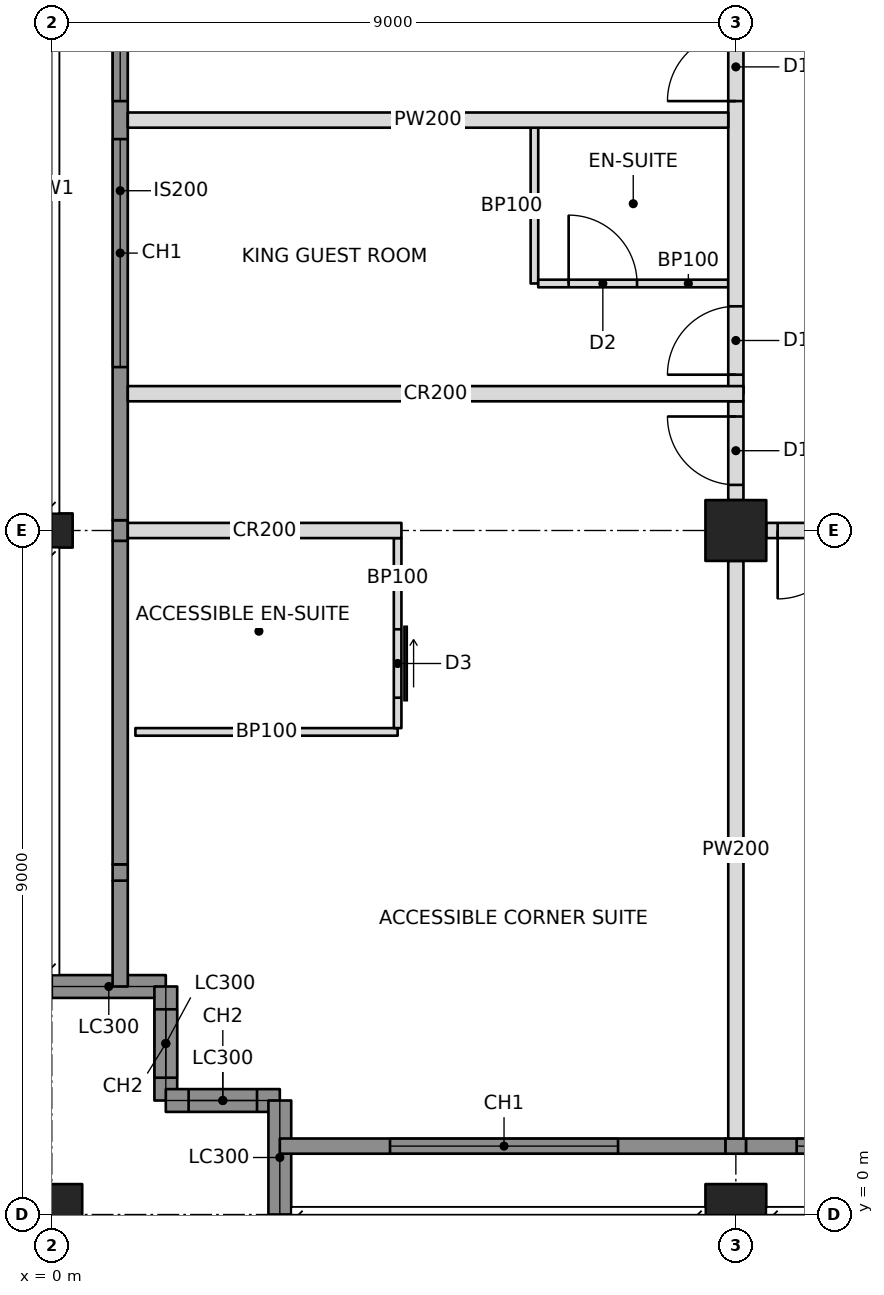
"""IFC4 building model, lengths in metres.
Left out: names, types, materials, properties, quantities, classifications, styles, units other than length and angle.
Written with IfcOpenShell. Run it as: python <this file> out.ifc"""

import sys

from ifc_helpers import new_model, si_unit, direction, frame, frame_2d, origin, origin_with_axes, origin_2d, place, context, subcontext, project, spatial, rectangle, hollow_rectangle, i_section, extrude, element, fill, save


model = new_model("IFC4")
c1 = context("Model", 3, precision=1e-05, world=origin(), true_north=direction((0.0, 1.0)))
c2 = subcontext(c1, "Body", "Model", "MODEL_VIEW")
j1 = project(units=[si_unit("LENGTHUNIT", "METRE"), si_unit("PLANEANGLEUNIT", "RADIAN")], contexts=[c1])
p1 = place(None, origin())
s1 = spatial("IfcSite", under=j1, at=p1, CompositionType="ELEMENT")
p2 = place(p1, origin())
s2 = spatial("IfcBuilding", under=s1, at=p2, CompositionType="ELEMENT")
p3 = place(p2, frame((0.0, 0.0, 174.0)))
s3 = spatial("IfcBuildingStorey", under=s2, at=p3, CompositionType="ELEMENT", Elevation=174.0)
p4 = place(p3, origin_with_axes())
e1 = element("IfcColumn", 1, at=p4, inside=s3, PredefinedType="COLUMN", context=c2, shape_type="SweptSolid", body=[
    extrude(hollow_rectangle(XDim=0.8, YDim=0.8, WallThickness=0.07, at=origin_2d()), origin(), (0.0, 0.0, 1.0), 3.4),
])
p5 = place(p3, frame((0.0, 9.0, 0.0), z_axis=(0.0, 0.0, 1.0), x_axis=(0.0, 1.0, 0.0)))
e2 = element("IfcColumn", 2, at=p5, inside=s3, PredefinedType="COLUMN", context=c2, shape_type="SweptSolid", body=[
    extrude(i_section(OverallWidth=0.449, OverallDepth=0.549, WebThickness=0.072, FlangeThickness=0.115, at=origin_2d()), origin(), (0.0, 0.0, 1.0), 3.4),
])
p6 = place(p3, frame((9.0, 0.0, 0.0), z_axis=(0.0, 0.0, 1.0), x_axis=(1.0, 0.0, 0.0)))
e3 = element("IfcColumn", 3, at=p6, inside=s3, PredefinedType="COLUMN", context=c2, shape_type="SweptSolid", body=[
    extrude(hollow_rectangle(XDim=0.8, YDim=0.8, WallThickness=0.07, at=origin_2d()), origin(), (0.0, 0.0, 1.0), 3.4),
])
p7 = place(p3, frame((9.0, 9.0, 0.0), z_axis=(0.0, 0.0, 1.0), x_axis=(1.0, 0.0, 0.0)))
e4 = element("IfcColumn", 4, at=p7, inside=s3, PredefinedType="COLUMN", context=c2, shape_type="SweptSolid", body=[
    extrude(hollow_rectangle(XDim=0.8, YDim=0.8, WallThickness=0.06, at=origin_2d()), origin(), (0.0, 0.0, 1.0), 3.4),
])
p8 = place(p3, frame((0.0, 3.0, 0.0), z_axis=(0.0, 0.0, 1.0), x_axis=(1.0, 0.0, 0.0)))
e5 = element("IfcWall", 5, at=p8, inside=s3, PredefinedType="SOLIDWALL", context=c2, shape_type="SweptSolid", body=[
    extrude(rectangle(XDim=1.5, YDim=0.3, at=frame_2d((0.75, 0.0))), origin(), (0.0, 0.0, 1.0), 2.42),
])
p9 = place(p3, frame((1.5, 3.0, 0.0), z_axis=(0.0, 0.0, 1.0), x_axis=(0.0, -1.0, 0.0)))
e6 = element("IfcWall", 6, at=p9, inside=s3, PredefinedType="SOLIDWALL", context=c2, shape_type="SweptSolid", body=[
    extrude(rectangle(XDim=1.5, YDim=0.3, at=frame_2d((0.75, 0.0))), origin(), (0.0, 0.0, 1.0), 3.2),
])
p10 = place(p9, frame((0.3, 0.0, 0.6)))
e7 = element("IfcOpeningElement", 7, at=p10, cuts=e6, PredefinedType="OPENING", context=c2, shape_type="SweptSolid", body=[
    extrude(rectangle(XDim=0.9, YDim=2.2, at=frame_2d((0.45, 1.1))), frame((0.0, 0.16, 0.0), z_axis=(0.0, -1.0, 0.0), x_axis=(1.0, 0.0, 0.0)), (0.0, 0.0, 1.0), 0.32),
])
p11 = place(p3, frame((1.5, 1.5, 0.0), z_axis=(0.0, 0.0, 1.0), x_axis=(1.0, 0.0, 0.0)))
e8 = element("IfcWall", 8, at=p11, inside=s3, PredefinedType="SOLIDWALL", context=c2, shape_type="SweptSolid", body=[
    extrude(rectangle(XDim=1.5, YDim=0.3, at=frame_2d((0.75, 0.0))), origin(), (0.0, 0.0, 1.0), 3.2),
])
p12 = place(p11, frame((0.3, 0.0, 0.6)))
e9 = element("IfcOpeningElement", 9, at=p12, cuts=e8, PredefinedType="OPENING", context=c2, shape_type="SweptSolid", body=[
    extrude(rectangle(XDim=0.9, YDim=2.2, at=frame_2d((0.45, 1.1))), frame((0.0, 0.16, 0.0), z_axis=(0.0, -1.0, 0.0), x_axis=(1.0, 0.0, 0.0)), (0.0, 0.0, 1.0), 0.32),
])
p13 = place(p3, frame((3.0, 1.5, 0.0), z_axis=(0.0, 0.0, 1.0), x_axis=(0.0, -1.0, 0.0)))
e10 = element("IfcWall", 10, at=p13, inside=s3, PredefinedType="SOLIDWALL", context=c2, shape_type="SweptSolid", body=[
    extrude(rectangle(XDim=1.5, YDim=0.3, at=frame_2d((0.75, 0.0))), origin(), (0.0, 0.0, 1.0), 2.42),
])
p14 = place(p3, frame((3.0, 0.9, 0.0), z_axis=(0.0, 0.0, 1.0), x_axis=(1.0, 0.0, 0.0)))
e11 = element("IfcWall", 11, at=p14, inside=s3, PredefinedType="SOLIDWALL", context=c2, shape_type="SweptSolid", body=[
    extrude(rectangle(XDim=5.865, YDim=0.2, at=frame_2d((2.932, 0.0))), origin(), (0.0, 0.0, 1.0), 3.2),
])
p15 = place(p14, frame((1.45, 0.0, 0.6)))
e12 = element("IfcOpeningElement", 12, at=p15, cuts=e11, PredefinedType="OPENING", context=c2, shape_type="SweptSolid", body=[
    extrude(rectangle(XDim=3.0, YDim=2.2, at=frame_2d((1.5, 1.1))), frame((0.0, 0.11, 0.0), z_axis=(0.0, -1.0, 0.0), x_axis=(1.0, 0.0, 0.0)), (0.0, 0.0, 1.0), 0.22),
])
p16 = place(p3, frame((0.9, 3.0, 0.0), z_axis=(0.0, 0.0, 1.0), x_axis=(0.0, 1.0, 0.0)))
e13 = element("IfcWall", 13, at=p16, inside=s3, PredefinedType="SOLIDWALL", context=c2, shape_type="SweptSolid", body=[
    extrude(rectangle(XDim=1.393, YDim=0.2, at=frame_2d((0.696, 0.0))), origin(), (0.0, 0.0, 1.0), 3.2),
])
p17 = place(p3, frame((1.0, 9.0, 0.0), z_axis=(0.0, 0.0, 1.0), x_axis=(1.0, 0.0, 0.0)))
e14 = element("IfcWall", 14, at=p17, inside=s3, PredefinedType="PARTITIONING", context=c2, shape_type="SweptSolid", body=[
    extrude(rectangle(XDim=3.6, YDim=0.2, at=frame_2d((1.8, 0.0))), origin(), (0.0, 0.0, 1.0), 2.438),
])
p18 = place(p3, frame((9.4, 9.0, 0.0), z_axis=(0.0, 0.0, 1.0), x_axis=(1.0, 0.0, 0.0)))
e15 = element("IfcWall", 15, at=p18, inside=s3, PredefinedType="PARTITIONING", context=c2, shape_type="SweptSolid", body=[
    extrude(rectangle(XDim=8.2, YDim=0.2, at=frame_2d((4.1, 0.0))), origin(), (0.0, 0.0, 1.0), 2.405),
])
p19 = place(p18, frame((0.15, 0.0, 0.0)))
e16 = element("IfcOpeningElement", 16, at=p19, cuts=e15, PredefinedType="OPENING", context=c2, shape_type="SweptSolid", body=[
    extrude(rectangle(XDim=0.9, YDim=2.1, at=frame_2d((0.45, 1.05))), frame((0.0, 0.11, 0.0), z_axis=(0.0, -1.0, 0.0), x_axis=(1.0, 0.0, 0.0)), (0.0, 0.0, 1.0), 0.22),
])
p20 = place(p3, frame((9.0, 10.8, 0.0), z_axis=(0.0, 0.0, 1.0), x_axis=(0.0, 1.0, 0.0)))
e17 = element("IfcWall", 17, at=p20, inside=s3, PredefinedType="PARTITIONING", context=c2, shape_type="SweptSolid", body=[
    extrude(rectangle(XDim=6.8, YDim=0.2, at=frame_2d((3.4, 0.0))), origin(), (0.0, 0.0, 1.0), 2.405),
])
p21 = place(p20, frame((0.25, 0.0, 0.0)))
e18 = element("IfcOpeningElement", 18, at=p21, cuts=e17, PredefinedType="OPENING", context=c2, shape_type="SweptSolid", body=[
    extrude(rectangle(XDim=0.9, YDim=2.1, at=frame_2d((0.45, 1.05))), frame((0.0, 0.11, 0.0), z_axis=(0.0, -1.0, 0.0), x_axis=(1.0, 0.0, 0.0)), (0.0, 0.0, 1.0), 0.22),
])
p22 = place(p20, frame((3.85, 0.0, 0.0)))
e19 = element("IfcOpeningElement", 19, at=p22, cuts=e17, PredefinedType="OPENING", context=c2, shape_type="SweptSolid", body=[
    extrude(rectangle(XDim=0.9, YDim=2.1, at=frame_2d((0.45, 1.05))), frame((0.0, 0.11, 0.0), z_axis=(0.0, -1.0, 0.0), x_axis=(1.0, 0.0, 0.0)), (0.0, 0.0, 1.0), 0.22),
])
p23 = place(p3, frame((1.0, 10.8, 0.0), z_axis=(0.0, 0.0, 1.0), x_axis=(1.0, 0.0, 0.0)))
e20 = element("IfcWall", 20, at=p23, inside=s3, PredefinedType="PARTITIONING", context=c2, shape_type="SweptSolid", body=[
    extrude(rectangle(XDim=8.1, YDim=0.2, at=frame_2d((4.05, 0.0))), origin(), (0.0, 0.0, 1.0), 2.404),
])
p24 = place(p3, frame((9.0, 8.6, 0.0), z_axis=(0.0, 0.0, 1.0), x_axis=(0.0, -1.0, 0.0)))
e21 = element("IfcWall", 21, at=p24, inside=s3, PredefinedType="PARTITIONING", context=c2, shape_type="SweptSolid", body=[
    extrude(rectangle(XDim=7.6, YDim=0.2, at=frame_2d((3.8, 0.0))), origin(), (0.0, 0.0, 1.0), 2.438),
])
p25 = place(p3, frame((1.1, 6.35, 0.0), z_axis=(0.0, 0.0, 1.0), x_axis=(1.0, 0.0, 0.0)))
e22 = element("IfcWall", 22, at=p25, inside=s3, PredefinedType="PARTITIONING", context=c2, shape_type="SweptSolid", body=[
    extrude(rectangle(XDim=3.45, YDim=0.1, at=frame_2d((1.725, 0.0))), origin(), (0.0, 0.0, 1.0), 3.2),
])
p26 = place(p3, frame((4.55, 8.9, 0.0), z_axis=(0.0, 0.0, 1.0), x_axis=(0.0, -1.0, 0.0)))
e23 = element("IfcWall", 23, at=p26, inside=s3, PredefinedType="PARTITIONING", context=c2, shape_type="SweptSolid", body=[
    extrude(rectangle(XDim=2.5, YDim=0.1, at=frame_2d((1.25, 0.0))), origin(), (0.0, 0.0, 1.0), 2.438),
])
p27 = place(p26, frame((1.2, 0.0, 0.0)))
e24 = element("IfcOpeningElement", 24, at=p27, cuts=e23, PredefinedType="OPENING", context=c2, shape_type="SweptSolid", body=[
    extrude(rectangle(XDim=0.9, YDim=2.1, at=frame_2d((0.45, 1.05))), frame((0.0, 0.06, 0.0), z_axis=(0.0, -1.0, 0.0), x_axis=(1.0, 0.0, 0.0)), (0.0, 0.0, 1.0), 0.12),
])
p28 = place(p3, frame((8.9, 14.4, 0.0), z_axis=(0.0, 0.0, 1.0), x_axis=(-1.0, 0.0, 0.0)))
e25 = element("IfcWall", 25, at=p28, inside=s3, PredefinedType="PARTITIONING", context=c2, shape_type="SweptSolid", body=[
    extrude(rectangle(XDim=7.9, YDim=0.2, at=frame_2d((3.95, 0.0))), origin(), (0.0, 0.0, 1.0), 2.404),
])
p29 = place(p3, frame((6.35, 12.25, 0.0), z_axis=(0.0, 0.0, 1.0), x_axis=(0.0, 1.0, 0.0)))
e26 = element("IfcWall", 26, at=p29, inside=s3, PredefinedType="PARTITIONING", context=c2, shape_type="SweptSolid", body=[
    extrude(rectangle(XDim=2.05, YDim=0.1, at=frame_2d((1.025, 0.0))), origin(), (0.0, 0.0, 1.0), 3.2),
])
p30 = place(p3, frame((8.9, 12.25, 0.0), z_axis=(0.0, 0.0, 1.0), x_axis=(-1.0, 0.0, 0.0)))
e27 = element("IfcWall", 27, at=p30, inside=s3, PredefinedType="PARTITIONING", context=c2, shape_type="SweptSolid", body=[
    extrude(rectangle(XDim=2.5, YDim=0.1, at=frame_2d((1.25, 0.0))), origin(), (0.0, 0.0, 1.0), 2.404),
])
p31 = place(p30, frame((1.2, 0.0, 0.0)))
e28 = element("IfcOpeningElement", 28, at=p31, cuts=e27, PredefinedType="OPENING", context=c2, shape_type="SweptSolid", body=[
    extrude(rectangle(XDim=0.9, YDim=2.1, at=frame_2d((0.45, 1.05))), frame((0.0, 0.06, 0.0), z_axis=(0.0, -1.0, 0.0), x_axis=(1.0, 0.0, 0.0)), (0.0, 0.0, 1.0), 0.12),
])
p32 = place(p3, frame((9.0, 9.4, 0.0), z_axis=(0.0, 0.0, 1.0), x_axis=(0.0, 1.0, 0.0)))
e29 = element("IfcWall", 29, at=p32, inside=s3, PredefinedType="PARTITIONING", context=c2, shape_type="SweptSolid", body=[
    extrude(rectangle(XDim=1.3, YDim=0.2, at=frame_2d((0.65, 0.0))), origin(), (0.0, 0.0, 1.0), 2.405),
])
p33 = place(p32, frame((0.2, 0.0, 0.0)))
e30 = element("IfcOpeningElement", 30, at=p33, cuts=e29, PredefinedType="OPENING", context=c2, shape_type="SweptSolid", body=[
    extrude(rectangle(XDim=0.9, YDim=2.1, at=frame_2d((0.45, 1.05))), frame((0.0, 0.11, 0.0), z_axis=(0.0, -1.0, 0.0), x_axis=(1.0, 0.0, 0.0)), (0.0, 0.0, 1.0), 0.22),
])
p34 = place(p3, frame((8.865, 0.9, 0.0), z_axis=(0.0, 0.0, 1.0), x_axis=(1.0, 0.0, 0.0)))
e31 = element("IfcWall", 31, at=p34, inside=s3, PredefinedType="SOLIDWALL", context=c2, shape_type="SweptSolid", body=[
    extrude(rectangle(XDim=0.271, YDim=0.2, at=frame_2d((0.135, 0.0))), origin(), (0.0, 0.0, 1.0), 2.438),
])
p35 = place(p3, frame((9.135, 0.9, 0.0), z_axis=(0.0, 0.0, 1.0), x_axis=(1.0, 0.0, 0.0)))
e32 = element("IfcWall", 32, at=p35, inside=s3, PredefinedType="SOLIDWALL", context=c2, shape_type="SweptSolid", body=[
    extrude(rectangle(XDim=8.671, YDim=0.2, at=frame_2d((4.335, 0.0))), origin(), (0.0, 0.0, 1.0), 3.2),
])
p36 = place(p35, frame((0.665, 0.0, 0.6)))
e33 = element("IfcOpeningElement", 33, at=p36, cuts=e32, PredefinedType="OPENING", context=c2, shape_type="SweptSolid", body=[
    extrude(rectangle(XDim=3.0, YDim=2.2, at=frame_2d((1.5, 1.1))), frame((0.0, 0.11, 0.0), z_axis=(0.0, -1.0, 0.0), x_axis=(1.0, 0.0, 0.0)), (0.0, 0.0, 1.0), 0.22),
])
p37 = place(p35, frame((5.065, 0.0, 0.6)))
e34 = element("IfcOpeningElement", 34, at=p37, cuts=e32, PredefinedType="OPENING", context=c2, shape_type="SweptSolid", body=[
    extrude(rectangle(XDim=3.0, YDim=2.2, at=frame_2d((1.5, 1.1))), frame((0.0, 0.11, 0.0), z_axis=(0.0, -1.0, 0.0), x_axis=(1.0, 0.0, 0.0)), (0.0, 0.0, 1.0), 0.22),
])
p38 = place(p3, frame((0.9, 4.393, 0.0), z_axis=(0.0, 0.0, 1.0), x_axis=(0.0, 1.0, 0.0)))
e35 = element("IfcWall", 35, at=p38, inside=s3, PredefinedType="SOLIDWALL", context=c2, shape_type="SweptSolid", body=[
    extrude(rectangle(XDim=0.215, YDim=0.2, at=frame_2d((0.107, 0.0))), origin(), (0.0, 0.0, 1.0), 2.661),
])
p39 = place(p3, frame((0.9, 4.607, 0.0), z_axis=(0.0, 0.0, 1.0), x_axis=(0.0, 1.0, 0.0)))
e36 = element("IfcWall", 36, at=p39, inside=s3, PredefinedType="SOLIDWALL", context=c2, shape_type="SweptSolid", body=[
    extrude(rectangle(XDim=4.257, YDim=0.2, at=frame_2d((2.129, 0.0))), origin(), (0.0, 0.0, 1.0), 3.2),
])
p40 = place(p3, frame((0.9, 8.865, 0.0), z_axis=(0.0, 0.0, 1.0), x_axis=(0.0, 1.0, 0.0)))
e37 = element("IfcWall", 37, at=p40, inside=s3, PredefinedType="SOLIDWALL", context=c2, shape_type="SweptSolid", body=[
    extrude(rectangle(XDim=0.271, YDim=0.2, at=frame_2d((0.135, 0.0))), origin(), (0.0, 0.0, 1.0), 2.438),
])
p41 = place(p3, frame((0.9, 9.135, 0.0), z_axis=(0.0, 0.0, 1.0), x_axis=(0.0, 1.0, 0.0)))
e38 = element("IfcWall", 38, at=p41, inside=s3, PredefinedType="SOLIDWALL", context=c2, shape_type="SweptSolid", body=[
    extrude(rectangle(XDim=8.671, YDim=0.2, at=frame_2d((4.335, 0.0))), origin(), (0.0, 0.0, 1.0), 3.2),
])
p42 = place(p41, frame((2.015, 0.0, 0.6)))
e39 = element("IfcOpeningElement", 39, at=p42, cuts=e38, PredefinedType="OPENING", context=c2, shape_type="SweptSolid", body=[
    extrude(rectangle(XDim=3.0, YDim=2.2, at=frame_2d((1.5, 1.1))), frame((0.0, 0.11, 0.0), z_axis=(0.0, -1.0, 0.0), x_axis=(1.0, 0.0, 0.0)), (0.0, 0.0, 1.0), 0.22),
])
p43 = place(p41, frame((5.515, 0.0, 0.6)))
e40 = element("IfcOpeningElement", 40, at=p43, cuts=e38, PredefinedType="OPENING", context=c2, shape_type="SweptSolid", body=[
    extrude(rectangle(XDim=3.0, YDim=2.2, at=frame_2d((1.5, 1.1))), frame((0.0, 0.11, 0.0), z_axis=(0.0, -1.0, 0.0), x_axis=(1.0, 0.0, 0.0)), (0.0, 0.0, 1.0), 0.22),
])
p44 = place(p10, origin())
e41 = element("IfcWindow", 41, at=p44, inside=s3, PartitioningType="SINGLE_PANEL", PredefinedType="WINDOW", context=c2, shape_type="SweptSolid", body=[
    extrude(rectangle(XDim=0.9, YDim=2.2, at=frame_2d((0.45, 1.1))), frame((0.0, 0.03, 0.0), z_axis=(0.0, -1.0, 0.0), x_axis=(1.0, 0.0, 0.0)), (0.0, 0.0, 1.0), 0.06),
])
fill(e7, e41)
p45 = place(p12, origin())
e42 = element("IfcWindow", 42, at=p45, inside=s3, PartitioningType="SINGLE_PANEL", PredefinedType="WINDOW", context=c2, shape_type="SweptSolid", body=[
    extrude(rectangle(XDim=0.9, YDim=2.2, at=frame_2d((0.45, 1.1))), frame((0.0, 0.03, 0.0), z_axis=(0.0, -1.0, 0.0), x_axis=(1.0, 0.0, 0.0)), (0.0, 0.0, 1.0), 0.06),
])
fill(e9, e42)
p46 = place(p15, origin())
e43 = element("IfcWindow", 43, at=p46, inside=s3, PartitioningType="TRIPLE_PANEL_VERTICAL", PredefinedType="WINDOW", context=c2, shape_type="SweptSolid", body=[
    extrude(rectangle(XDim=3.0, YDim=2.2, at=frame_2d((1.5, 1.1))), frame((0.0, 0.03, 0.0), z_axis=(0.0, -1.0, 0.0), x_axis=(1.0, 0.0, 0.0)), (0.0, 0.0, 1.0), 0.06),
])
fill(e12, e43)
p47 = place(p36, origin())
e44 = element("IfcWindow", 44, at=p47, inside=s3, PartitioningType="TRIPLE_PANEL_VERTICAL", PredefinedType="WINDOW", context=c2, shape_type="SweptSolid", body=[
    extrude(rectangle(XDim=3.0, YDim=2.2, at=frame_2d((1.5, 1.1))), frame((0.0, 0.03, 0.0), z_axis=(0.0, -1.0, 0.0), x_axis=(1.0, 0.0, 0.0)), (0.0, 0.0, 1.0), 0.06),
])
fill(e33, e44)
p48 = place(p42, origin())
e45 = element("IfcWindow", 45, at=p48, inside=s3, PartitioningType="TRIPLE_PANEL_VERTICAL", PredefinedType="WINDOW", context=c2, shape_type="SweptSolid", body=[
    extrude(rectangle(XDim=3.0, YDim=2.2, at=frame_2d((1.5, 1.1))), frame((0.0, 0.03, 0.0), z_axis=(0.0, -1.0, 0.0), x_axis=(1.0, 0.0, 0.0)), (0.0, 0.0, 1.0), 0.06),
])
fill(e39, e45)
p49 = place(p43, origin())
e46 = element("IfcWindow", 46, at=p49, inside=s3, PartitioningType="TRIPLE_PANEL_VERTICAL", PredefinedType="WINDOW", context=c2, shape_type="SweptSolid", body=[
    extrude(rectangle(XDim=3.0, YDim=2.2, at=frame_2d((1.5, 1.1))), frame((0.0, 0.03, 0.0), z_axis=(0.0, -1.0, 0.0), x_axis=(1.0, 0.0, 0.0)), (0.0, 0.0, 1.0), 0.06),
])
fill(e40, e46)
p50 = place(p27, origin())
e47 = element("IfcDoor", 47, at=p50, inside=s3, OperationType="SLIDING_TO_LEFT", PredefinedType="DOOR", context=c2, shape_type="SweptSolid", body=[
    extrude(rectangle(XDim=0.9, YDim=2.1, at=frame_2d((0.45, 1.05))), frame((0.0, 0.025, 0.0), z_axis=(0.0, -1.0, 0.0), x_axis=(1.0, 0.0, 0.0)), (0.0, 0.0, 1.0), 0.05),
])
fill(e24, e47)
p51 = place(p19, frame((0.9, 0.0, 0.0), z_axis=(0.0, 0.0, 1.0), x_axis=(-1.0, 0.0, 0.0)))
e48 = element("IfcDoor", 48, at=p51, inside=s3, OperationType="SINGLE_SWING_RIGHT", PredefinedType="DOOR", context=c2, shape_type="SweptSolid", body=[
    extrude(rectangle(XDim=0.9, YDim=2.1, at=frame_2d((0.45, 1.05))), frame((0.0, 0.025, 0.0), z_axis=(0.0, -1.0, 0.0), x_axis=(1.0, 0.0, 0.0)), (0.0, 0.0, 1.0), 0.05),
])
fill(e16, e48)
p52 = place(p31, frame((0.9, 0.0, 0.0), z_axis=(0.0, 0.0, 1.0), x_axis=(-1.0, 0.0, 0.0)))
e49 = element("IfcDoor", 49, at=p52, inside=s3, OperationType="SINGLE_SWING_LEFT", PredefinedType="DOOR", context=c2, shape_type="SweptSolid", body=[
    extrude(rectangle(XDim=0.9, YDim=2.1, at=frame_2d((0.45, 1.05))), frame((0.0, 0.025, 0.0), z_axis=(0.0, -1.0, 0.0), x_axis=(1.0, 0.0, 0.0)), (0.0, 0.0, 1.0), 0.05),
])
fill(e28, e49)
p53 = place(p21, origin())
e50 = element("IfcDoor", 50, at=p53, inside=s3, OperationType="SINGLE_SWING_LEFT", PredefinedType="DOOR", context=c2, shape_type="SweptSolid", body=[
    extrude(rectangle(XDim=0.9, YDim=2.1, at=frame_2d((0.45, 1.05))), frame((0.0, 0.025, 0.0), z_axis=(0.0, -1.0, 0.0), x_axis=(1.0, 0.0, 0.0)), (0.0, 0.0, 1.0), 0.05),
])
fill(e18, e50)
p54 = place(p22, origin())
e51 = element("IfcDoor", 51, at=p54, inside=s3, OperationType="SINGLE_SWING_LEFT", PredefinedType="DOOR", context=c2, shape_type="SweptSolid", body=[
    extrude(rectangle(XDim=0.9, YDim=2.1, at=frame_2d((0.45, 1.05))), frame((0.0, 0.025, 0.0), z_axis=(0.0, -1.0, 0.0), x_axis=(1.0, 0.0, 0.0)), (0.0, 0.0, 1.0), 0.05),
])
fill(e19, e51)
p55 = place(p33, origin())
e52 = element("IfcDoor", 52, at=p55, inside=s3, OperationType="SINGLE_SWING_RIGHT", PredefinedType="DOOR", context=c2, shape_type="SweptSolid", body=[
    extrude(rectangle(XDim=0.9, YDim=2.1, at=frame_2d((0.45, 1.05))), frame((0.0, 0.025, 0.0), z_axis=(0.0, -1.0, 0.0), x_axis=(1.0, 0.0, 0.0)), (0.0, 0.0, 1.0), 0.05),
])
fill(e30, e52)
save(model, sys.argv[1])
